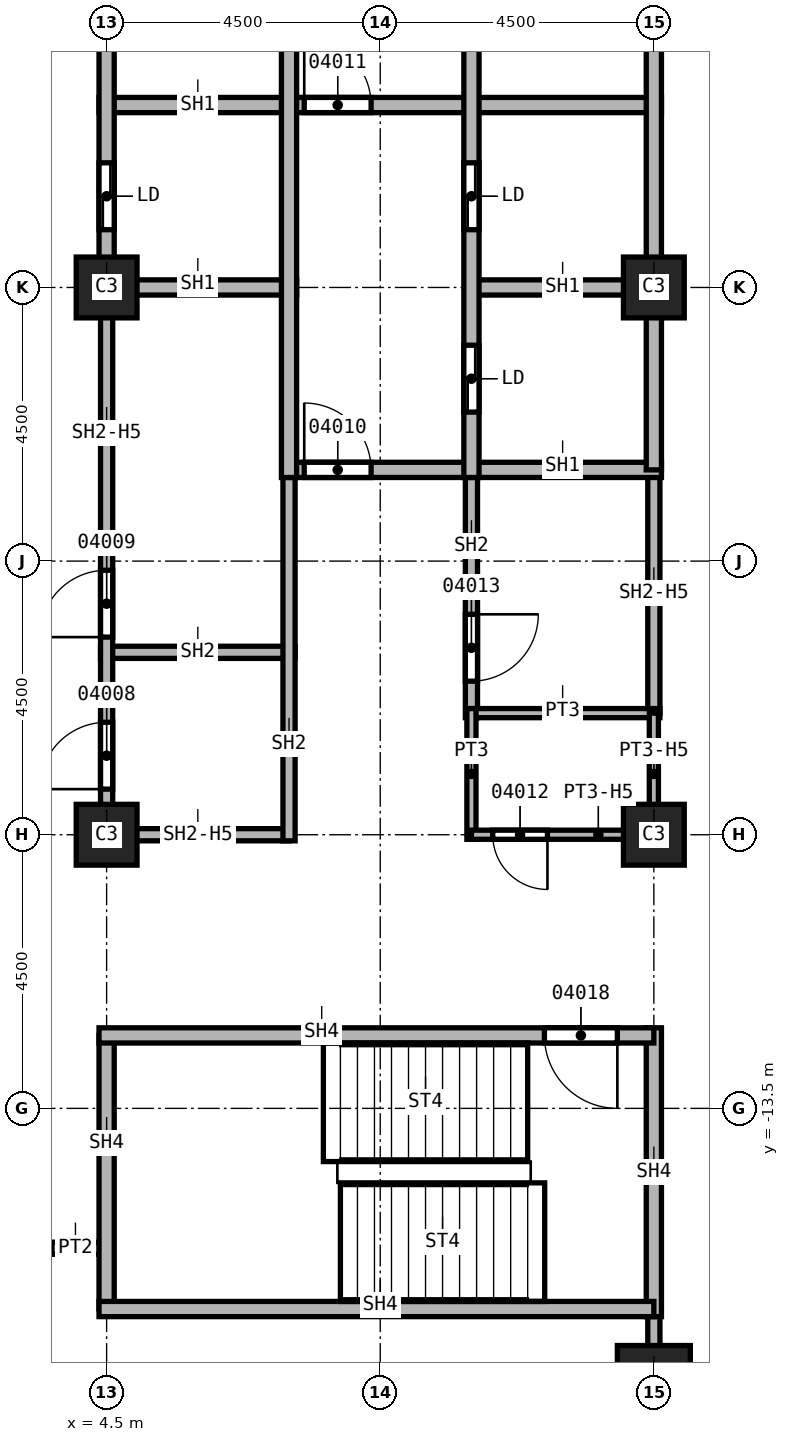
"""IFC4 building model, lengths in metres.
Left out: names, types, materials, properties, quantities, classifications, styles, units other than length and angle.
Written with IfcOpenShell. Run it as: python <this file> out.ifc"""

import sys

from ifc_helpers import new_model, si_unit, direction, frame, frame_2d, origin, origin_2d, place, context, subcontext, project, spatial, rectangle, extrude, element, fill, save


model = new_model("IFC4")
c1 = context("Model", 3, precision=1e-05, world=origin(), true_north=direction((0.0, 1.0)))
c2 = subcontext(c1, "Body", "Model", "MODEL_VIEW")
j1 = project(units=[si_unit("LENGTHUNIT", "METRE"), si_unit("PLANEANGLEUNIT", "RADIAN")], contexts=[c1])
p1 = place(None, origin())
s1 = spatial("IfcSite", under=j1, at=p1, CompositionType="ELEMENT")
p2 = place(p1, origin())
s2 = spatial("IfcBuilding", under=s1, at=p2, CompositionType="ELEMENT")
p3 = place(p2, frame((0.0, 0.0, 104.0)))
s3 = spatial("IfcBuildingStorey", under=s2, at=p3, CompositionType="ELEMENT", Elevation=104.0)
p4 = place(p3, frame((13.5, -18.0, 0.0), z_axis=(0.0, 0.0, 1.0), x_axis=(1.0, 0.0, 0.0)))
e1 = element("IfcColumn", 1, at=p4, inside=s3, PredefinedType="COLUMN", context=c2, shape_type="SweptSolid", body=[
    extrude(rectangle(XDim=1.2, YDim=1.2, at=origin_2d()), origin(), (0.0, 0.0, 1.0), 3.7),
])
for number, where, z_axis, x_axis in (
    (2, (4.5, 0.0, 0.0), (0.0, 0.0, 1.0), (1.0, 0.0, 0.0)),
    (3, (4.5, -9.0, 0.0), (0.0, 0.0, 1.0), (1.0, 0.0, 0.0)),
    (4, (13.5, 0.0, 0.0), (0.0, 0.0, 1.0), (1.0, 0.0, 0.0)),
    (5, (13.5, -9.0, 0.0), (0.0, 0.0, 1.0), (1.0, 0.0, 0.0)),
):
    element("IfcColumn", number, at=place(p3, frame(where, z_axis=z_axis, x_axis=x_axis)), inside=s3, PredefinedType="COLUMN", context=c2, shape_type="SweptSolid", body=[
        extrude(rectangle(XDim=1.0, YDim=1.0, at=origin_2d()), origin(), (0.0, 0.0, 1.0), 3.7),
    ])
p5 = place(p3, frame((4.5, -15.8, 0.0), z_axis=(0.0, 0.0, 1.0), x_axis=(-1.0, 0.0, 0.0)))
e6 = element("IfcWall", 6, at=p5, inside=s3, PredefinedType="PARTITIONING", context=c2, shape_type="SweptSolid", body=[
    extrude(rectangle(XDim=0.9, YDim=0.2, at=frame_2d((0.45, 0.0))), origin(), (0.0, 0.0, 1.0), 3.7),
])
p6 = place(p3, frame((13.5, -24.2, 0.0), z_axis=(0.0, 0.0, 1.0), x_axis=(0.0, 1.0, 0.0)))
e7 = element("IfcWall", 7, at=p6, inside=s3, PredefinedType="PARTITIONING", context=c2, shape_type="SweptSolid", body=[
    extrude(rectangle(XDim=7.525, YDim=0.2, at=frame_2d((3.762, 0.0))), origin(), (0.0, 0.0, 1.0), 3.7),
])
p7 = place(p6, frame((0.55, 0.0, 0.0)))
e8 = element("IfcOpeningElement", 8, at=p7, cuts=e7, PredefinedType="OPENING", context=c2, shape_type="SweptSolid", body=[
    extrude(rectangle(XDim=1.0, YDim=2.1, at=frame_2d((0.5, 1.05))), frame((0.0, 0.1, 0.0), z_axis=(0.0, -1.0, 0.0), x_axis=(1.0, 0.0, 0.0)), (0.0, 0.0, 1.0), 0.2),
])
p8 = place(p3, frame((4.4, -6.0, 0.0), z_axis=(0.0, 0.0, 1.0), x_axis=(1.0, 0.0, 0.0)))
e9 = element("IfcWall", 9, at=p8, inside=s3, PredefinedType="SOLIDWALL", context=c2, shape_type="SweptSolid", body=[
    extrude(rectangle(XDim=3.2, YDim=0.2, at=frame_2d((1.6, 0.0))), origin(), (0.0, 0.0, 1.0), 3.7),
])
p9 = place(p3, frame((4.5, -9.1, 0.0), z_axis=(0.0, 0.0, 1.0), x_axis=(0.0, 1.0, 0.0)))
e10 = element("IfcWall", 10, at=p9, inside=s3, PredefinedType="SOLIDWALL", context=c2, shape_type="SweptSolid", body=[
    extrude(rectangle(XDim=9.1, YDim=0.2, at=frame_2d((4.55, 0.0))), origin(), (0.0, 0.0, 1.0), 2.938),
])
p10 = place(p9, frame((0.85, 0.0, 0.0)))
e11 = element("IfcOpeningElement", 11, at=p10, cuts=e10, PredefinedType="OPENING", context=c2, shape_type="SweptSolid", body=[
    extrude(rectangle(XDim=1.1, YDim=2.1, at=frame_2d((0.55, 1.05))), frame((0.0, 0.1, 0.0), z_axis=(0.0, -1.0, 0.0), x_axis=(1.0, 0.0, 0.0)), (0.0, 0.0, 1.0), 0.2),
])
p11 = place(p9, frame((3.35, 0.0, 0.0)))
e12 = element("IfcOpeningElement", 12, at=p11, cuts=e10, PredefinedType="OPENING", context=c2, shape_type="SweptSolid", body=[
    extrude(rectangle(XDim=1.1, YDim=2.1, at=frame_2d((0.55, 1.05))), frame((0.0, 0.1, 0.0), z_axis=(0.0, -1.0, 0.0), x_axis=(1.0, 0.0, 0.0)), (0.0, 0.0, 1.0), 0.2),
])
p12 = place(p3, frame((7.5, -9.0, 0.0), z_axis=(0.0, 0.0, 1.0), x_axis=(-1.0, 0.0, 0.0)))
e13 = element("IfcWall", 13, at=p12, inside=s3, PredefinedType="SOLIDWALL", context=c2, shape_type="SweptSolid", body=[
    extrude(rectangle(XDim=3.0, YDim=0.2, at=frame_2d((1.5, 0.0))), origin(), (0.0, 0.0, 1.0), 2.938),
])
p13 = place(p3, frame((7.5, -2.875, 0.0), z_axis=(0.0, 0.0, 1.0), x_axis=(0.0, -1.0, 0.0)))
e14 = element("IfcWall", 14, at=p13, inside=s3, PredefinedType="SOLIDWALL", context=c2, shape_type="SweptSolid", body=[
    extrude(rectangle(XDim=6.225, YDim=0.2, at=frame_2d((3.113, 0.0))), origin(), (0.0, 0.0, 1.0), 3.7),
])
p14 = place(p3, frame((10.5, -2.875, 0.0), z_axis=(0.0, 0.0, 1.0), x_axis=(0.0, -1.0, 0.0)))
e15 = element("IfcWall", 15, at=p14, inside=s3, PredefinedType="SOLIDWALL", context=c2, shape_type="SweptSolid", body=[
    extrude(rectangle(XDim=4.2, YDim=0.2, at=frame_2d((2.1, 0.0))), origin(), (0.0, 0.0, 1.0), 3.7),
])
p15 = place(p14, frame((2.5, 0.0, 0.0)))
e16 = element("IfcOpeningElement", 16, at=p15, cuts=e15, PredefinedType="OPENING", context=c2, shape_type="SweptSolid", body=[
    extrude(rectangle(XDim=1.1, YDim=2.1, at=frame_2d((0.55, 1.05))), frame((0.0, 0.1, 0.0), z_axis=(0.0, -1.0, 0.0), x_axis=(1.0, 0.0, 0.0)), (0.0, 0.0, 1.0), 0.2),
])
p16 = place(p3, frame((13.5, -3.0, 0.0), z_axis=(0.0, 0.0, 1.0), x_axis=(0.0, -1.0, 0.0)))
e17 = element("IfcWall", 17, at=p16, inside=s3, PredefinedType="SOLIDWALL", context=c2, shape_type="SweptSolid", body=[
    extrude(rectangle(XDim=4.0, YDim=0.2, at=frame_2d((2.0, 0.0))), origin(), (0.0, 0.0, 1.0), 2.938),
])
p17 = place(p3, frame((4.375, 0.0, 0.0), z_axis=(0.0, 0.0, 1.0), x_axis=(1.0, 0.0, 0.0)))
e18 = element("IfcWall", 18, at=p17, inside=s3, PredefinedType="SOLIDWALL", context=c2, shape_type="SweptSolid", body=[
    extrude(rectangle(XDim=3.25, YDim=0.25, at=frame_2d((1.625, 0.0))), origin(), (0.0, 0.0, 1.0), 3.7),
])
p18 = place(p3, frame((4.375, 3.0, 0.0), z_axis=(0.0, 0.0, 1.0), x_axis=(1.0, 0.0, 0.0)))
e19 = element("IfcWall", 19, at=p18, inside=s3, PredefinedType="SOLIDWALL", context=c2, shape_type="SweptSolid", body=[
    extrude(rectangle(XDim=9.25, YDim=0.25, at=frame_2d((4.625, 0.0))), origin(), (0.0, 0.0, 1.0), 3.7),
])
p19 = place(p18, frame((3.375, 0.0, 0.0)))
e20 = element("IfcOpeningElement", 20, at=p19, cuts=e19, PredefinedType="OPENING", context=c2, shape_type="SweptSolid", body=[
    extrude(rectangle(XDim=1.1, YDim=2.1, at=frame_2d((0.55, 1.05))), frame((0.0, 0.125, 0.0), z_axis=(0.0, -1.0, 0.0), x_axis=(1.0, 0.0, 0.0)), (0.0, 0.0, 1.0), 0.25),
])
p20 = place(p3, frame((4.5, 0.0, 0.0), z_axis=(0.0, 0.0, 1.0), x_axis=(0.0, 1.0, 0.0)))
e21 = element("IfcWall", 21, at=p20, inside=s3, PredefinedType="SOLIDWALL", context=c2, shape_type="SweptSolid", body=[
    extrude(rectangle(XDim=9.125, YDim=0.25, at=frame_2d((4.562, 0.0))), origin(), (0.0, 0.0, 1.0), 2.938),
])
p21 = place(p20, frame((0.95, 0.0, 0.0)))
e22 = element("IfcOpeningElement", 22, at=p21, cuts=e21, PredefinedType="OPENING", context=c2, shape_type="SweptSolid", body=[
    extrude(rectangle(XDim=1.1, YDim=2.1, at=frame_2d((0.55, 1.05))), frame((0.0, 0.125, 0.0), z_axis=(0.0, -1.0, 0.0), x_axis=(1.0, 0.0, 0.0)), (0.0, 0.0, 1.0), 0.25),
])
p22 = place(p20, frame((3.95, 0.0, 0.0)))
e23 = element("IfcOpeningElement", 23, at=p22, cuts=e21, PredefinedType="OPENING", context=c2, shape_type="SweptSolid", body=[
    extrude(rectangle(XDim=1.1, YDim=2.1, at=frame_2d((0.55, 1.05))), frame((0.0, 0.125, 0.0), z_axis=(0.0, -1.0, 0.0), x_axis=(1.0, 0.0, 0.0)), (0.0, 0.0, 1.0), 0.25),
])
p23 = place(p20, frame((7.012, 0.0, 0.0)))
e24 = element("IfcOpeningElement", 24, at=p23, cuts=e21, PredefinedType="OPENING", context=c2, shape_type="SweptSolid", body=[
    extrude(rectangle(XDim=1.1, YDim=2.1, at=frame_2d((0.55, 1.05))), frame((0.0, 0.125, 0.0), z_axis=(0.0, -1.0, 0.0), x_axis=(1.0, 0.0, 0.0)), (0.0, 0.0, 1.0), 0.25),
])
p24 = place(p3, frame((7.5, -3.0, 0.0), z_axis=(0.0, 0.0, 1.0), x_axis=(1.0, 0.0, 0.0)))
e25 = element("IfcWall", 25, at=p24, inside=s3, PredefinedType="SOLIDWALL", context=c2, shape_type="SweptSolid", body=[
    extrude(rectangle(XDim=6.125, YDim=0.25, at=frame_2d((3.062, 0.0))), origin(), (0.0, 0.0, 1.0), 3.7),
])
p25 = place(p24, frame((0.25, 0.0, 0.0)))
e26 = element("IfcOpeningElement", 26, at=p25, cuts=e25, PredefinedType="OPENING", context=c2, shape_type="SweptSolid", body=[
    extrude(rectangle(XDim=1.1, YDim=2.1, at=frame_2d((0.55, 1.05))), frame((0.0, 0.125, 0.0), z_axis=(0.0, -1.0, 0.0), x_axis=(1.0, 0.0, 0.0)), (0.0, 0.0, 1.0), 0.25),
])
p26 = place(p3, frame((7.5, 9.125, 0.0), z_axis=(0.0, 0.0, 1.0), x_axis=(0.0, -1.0, 0.0)))
e27 = element("IfcWall", 27, at=p26, inside=s3, PredefinedType="SOLIDWALL", context=c2, shape_type="SweptSolid", body=[
    extrude(rectangle(XDim=12.25, YDim=0.25, at=frame_2d((6.125, 0.0))), origin(), (0.0, 0.0, 1.0), 3.7),
])
p27 = place(p3, frame((10.5, 0.0, 0.0), z_axis=(0.0, 0.0, 1.0), x_axis=(1.0, 0.0, 0.0)))
e28 = element("IfcWall", 28, at=p27, inside=s3, PredefinedType="SOLIDWALL", context=c2, shape_type="SweptSolid", body=[
    extrude(rectangle(XDim=3.125, YDim=0.25, at=frame_2d((1.562, 0.0))), origin(), (0.0, 0.0, 1.0), 3.7),
])
p28 = place(p3, frame((10.5, 6.125, 0.0), z_axis=(0.0, 0.0, 1.0), x_axis=(0.0, -1.0, 0.0)))
e29 = element("IfcWall", 29, at=p28, inside=s3, PredefinedType="SOLIDWALL", context=c2, shape_type="SweptSolid", body=[
    extrude(rectangle(XDim=9.25, YDim=0.25, at=frame_2d((4.625, 0.0))), origin(), (0.0, 0.0, 1.0), 3.7),
])
p29 = place(p28, frame((7.075, 0.0, 0.0)))
e30 = element("IfcOpeningElement", 30, at=p29, cuts=e29, PredefinedType="OPENING", context=c2, shape_type="SweptSolid", body=[
    extrude(rectangle(XDim=1.1, YDim=2.1, at=frame_2d((0.55, 1.05))), frame((0.0, 0.125, 0.0), z_axis=(0.0, -1.0, 0.0), x_axis=(1.0, 0.0, 0.0)), (0.0, 0.0, 1.0), 0.25),
])
p30 = place(p28, frame((4.075, 0.0, 0.0)))
e31 = element("IfcOpeningElement", 31, at=p30, cuts=e29, PredefinedType="OPENING", context=c2, shape_type="SweptSolid", body=[
    extrude(rectangle(XDim=1.1, YDim=2.1, at=frame_2d((0.55, 1.05))), frame((0.0, 0.125, 0.0), z_axis=(0.0, -1.0, 0.0), x_axis=(1.0, 0.0, 0.0)), (0.0, 0.0, 1.0), 0.25),
])
p31 = place(p3, frame((13.5, 6.0, 0.0), z_axis=(0.0, 0.0, 1.0), x_axis=(0.0, -1.0, 0.0)))
e32 = element("IfcWall", 32, at=p31, inside=s3, PredefinedType="SOLIDWALL", context=c2, shape_type="SweptSolid", body=[
    extrude(rectangle(XDim=9.0, YDim=0.25, at=frame_2d((4.5, 0.0))), origin(), (0.0, 0.0, 1.0), 2.938),
])
p32 = place(p3, frame((4.5, -16.8, 0.0), z_axis=(0.0, 0.0, 1.0), x_axis=(0.0, 1.0, 0.0)))
e33 = element("IfcWall", 33, at=p32, inside=s3, PredefinedType="SOLIDWALL", context=c2, shape_type="SweptSolid", body=[
    extrude(rectangle(XDim=4.5, YDim=0.25, at=frame_2d((2.25, 0.0))), origin(), (0.0, 0.0, 1.0), 3.7),
])
p33 = place(p3, frame((13.5, -16.925, 0.0), z_axis=(0.0, 0.0, 1.0), x_axis=(0.0, 1.0, 0.0)))
e34 = element("IfcWall", 34, at=p33, inside=s3, PredefinedType="SOLIDWALL", context=c2, shape_type="SweptSolid", body=[
    extrude(rectangle(XDim=4.75, YDim=0.25, at=frame_2d((2.375, 0.0))), origin(), (0.0, 0.0, 1.0), 3.7),
])
p34 = place(p3, frame((13.5, -16.8, 0.0), z_axis=(0.0, 0.0, 1.0), x_axis=(-1.0, 0.0, 0.0)))
e35 = element("IfcWall", 35, at=p34, inside=s3, PredefinedType="SOLIDWALL", context=c2, shape_type="SweptSolid", body=[
    extrude(rectangle(XDim=9.125, YDim=0.25, at=frame_2d((4.562, 0.0))), origin(), (0.0, 0.0, 1.0), 3.7),
])
p35 = place(p3, frame((13.5, -12.3, 0.0), z_axis=(0.0, 0.0, 1.0), x_axis=(-1.0, 0.0, 0.0)))
e36 = element("IfcWall", 36, at=p35, inside=s3, PredefinedType="SOLIDWALL", context=c2, shape_type="SweptSolid", body=[
    extrude(rectangle(XDim=9.125, YDim=0.25, at=frame_2d((4.562, 0.0))), origin(), (0.0, 0.0, 1.0), 3.7),
])
p36 = place(p35, frame((0.6, 0.0, 0.0)))
e37 = element("IfcOpeningElement", 37, at=p36, cuts=e36, PredefinedType="OPENING", context=c2, shape_type="SweptSolid", body=[
    extrude(rectangle(XDim=1.2, YDim=2.1, at=frame_2d((0.6, 1.05))), frame((0.0, 0.125, 0.0), z_axis=(0.0, -1.0, 0.0), x_axis=(1.0, 0.0, 0.0)), (0.0, 0.0, 1.0), 0.25),
])
p37 = place(p3, frame((10.5, -7.0, 0.0), z_axis=(0.0, 0.0, 1.0), x_axis=(1.0, 0.0, 0.0)))
e38 = element("IfcWall", 38, at=p37, inside=s3, PredefinedType="PARTITIONING", context=c2, shape_type="SweptSolid", body=[
    extrude(rectangle(XDim=3.1, YDim=0.15, at=frame_2d((1.55, 0.0))), origin(), (0.0, 0.0, 1.0), 3.7),
])
p38 = place(p3, frame((10.5, -6.925, 0.0), z_axis=(0.0, 0.0, 1.0), x_axis=(0.0, -1.0, 0.0)))
e39 = element("IfcWall", 39, at=p38, inside=s3, PredefinedType="PARTITIONING", context=c2, shape_type="SweptSolid", body=[
    extrude(rectangle(XDim=2.15, YDim=0.15, at=frame_2d((1.075, 0.0))), origin(), (0.0, 0.0, 1.0), 3.7),
])
p39 = place(p3, frame((13.5, -9.0, 0.0), z_axis=(0.0, 0.0, 1.0), x_axis=(-1.0, 0.0, 0.0)))
e40 = element("IfcWall", 40, at=p39, inside=s3, PredefinedType="PARTITIONING", context=c2, shape_type="SweptSolid", body=[
    extrude(rectangle(XDim=3.0, YDim=0.15, at=frame_2d((1.5, 0.0))), origin(), (0.0, 0.0, 1.0), 2.938),
])
p40 = place(p39, frame((1.75, 0.0, 0.0)))
e41 = element("IfcOpeningElement", 41, at=p40, cuts=e40, PredefinedType="OPENING", context=c2, shape_type="SweptSolid", body=[
    extrude(rectangle(XDim=0.9, YDim=2.1, at=frame_2d((0.45, 1.05))), frame((0.0, 0.075, 0.0), z_axis=(0.0, -1.0, 0.0), x_axis=(1.0, 0.0, 0.0)), (0.0, 0.0, 1.0), 0.15),
])
p41 = place(p3, frame((13.5, -7.0, 0.0), z_axis=(0.0, 0.0, 1.0), x_axis=(0.0, -1.0, 0.0)))
e42 = element("IfcWall", 42, at=p41, inside=s3, PredefinedType="PARTITIONING", context=c2, shape_type="SweptSolid", body=[
    extrude(rectangle(XDim=2.075, YDim=0.15, at=frame_2d((1.038, 0.0))), origin(), (0.0, 0.0, 1.0), 2.938),
])
p42 = place(p10, origin())
e43 = element("IfcDoor", 43, at=p42, inside=s3, OperationType="SINGLE_SWING_LEFT", PredefinedType="DOOR", context=c2, shape_type="SweptSolid", body=[
    extrude(rectangle(XDim=1.1, YDim=2.1, at=frame_2d((0.55, 1.05))), frame((0.0, 0.025, 0.0), z_axis=(0.0, -1.0, 0.0), x_axis=(1.0, 0.0, 0.0)), (0.0, 0.0, 1.0), 0.05),
])
fill(e11, e43)
p43 = place(p11, origin())
e44 = element("IfcDoor", 44, at=p43, inside=s3, OperationType="SINGLE_SWING_RIGHT", PredefinedType="DOOR", context=c2, shape_type="SweptSolid", body=[
    extrude(rectangle(XDim=1.1, YDim=2.1, at=frame_2d((0.55, 1.05))), frame((0.0, 0.025, 0.0), z_axis=(0.0, -1.0, 0.0), x_axis=(1.0, 0.0, 0.0)), (0.0, 0.0, 1.0), 0.05),
])
fill(e12, e44)
p44 = place(p25, origin())
e45 = element("IfcDoor", 45, at=p44, inside=s3, OperationType="SINGLE_SWING_LEFT", PredefinedType="DOOR", context=c2, shape_type="SweptSolid", body=[
    extrude(rectangle(XDim=1.1, YDim=2.1, at=frame_2d((0.55, 1.05))), frame((0.0, 0.025, 0.0), z_axis=(0.0, -1.0, 0.0), x_axis=(1.0, 0.0, 0.0)), (0.0, 0.0, 1.0), 0.05),
])
fill(e26, e45)
p45 = place(p19, origin())
e46 = element("IfcDoor", 46, at=p45, inside=s3, OperationType="SINGLE_SWING_RIGHT", PredefinedType="DOOR", context=c2, shape_type="SweptSolid", body=[
    extrude(rectangle(XDim=1.1, YDim=2.1, at=frame_2d((0.55, 1.05))), frame((0.0, 0.025, 0.0), z_axis=(0.0, -1.0, 0.0), x_axis=(1.0, 0.0, 0.0)), (0.0, 0.0, 1.0), 0.05),
])
fill(e20, e46)
p46 = place(p40, origin())
e47 = element("IfcDoor", 47, at=p46, inside=s3, OperationType="SINGLE_SWING_LEFT", PredefinedType="DOOR", context=c2, shape_type="SweptSolid", body=[
    extrude(rectangle(XDim=0.9, YDim=2.1, at=frame_2d((0.45, 1.05))), frame((0.0, 0.025, 0.0), z_axis=(0.0, -1.0, 0.0), x_axis=(1.0, 0.0, 0.0)), (0.0, 0.0, 1.0), 0.05),
])
fill(e41, e47)
p47 = place(p15, origin())
e48 = element("IfcDoor", 48, at=p47, inside=s3, OperationType="SINGLE_SWING_RIGHT", PredefinedType="DOOR", context=c2, shape_type="SweptSolid", body=[
    extrude(rectangle(XDim=1.1, YDim=2.1, at=frame_2d((0.55, 1.05))), frame((0.0, 0.025, 0.0), z_axis=(0.0, -1.0, 0.0), x_axis=(1.0, 0.0, 0.0)), (0.0, 0.0, 1.0), 0.05),
])
fill(e16, e48)
p48 = place(p36, origin())
e49 = element("IfcDoor", 49, at=p48, inside=s3, OperationType="SINGLE_SWING_LEFT", PredefinedType="DOOR", context=c2, shape_type="SweptSolid", body=[
    extrude(rectangle(XDim=1.2, YDim=2.1, at=frame_2d((0.6, 1.05))), frame((0.0, 0.025, 0.0), z_axis=(0.0, -1.0, 0.0), x_axis=(1.0, 0.0, 0.0)), (0.0, 0.0, 1.0), 0.05),
])
fill(e37, e49)
p49 = place(p21, origin())
e50 = element("IfcDoor", 50, at=p49, inside=s3, OperationType="SLIDING_TO_LEFT", PredefinedType="DOOR", context=c2, shape_type="SweptSolid", body=[
    extrude(rectangle(XDim=1.1, YDim=2.1, at=frame_2d((0.55, 1.05))), frame((0.0, 0.025, 0.0), z_axis=(0.0, -1.0, 0.0), x_axis=(1.0, 0.0, 0.0)), (0.0, 0.0, 1.0), 0.05),
])
fill(e22, e50)
p50 = place(p29, origin())
e51 = element("IfcDoor", 51, at=p50, inside=s3, OperationType="SLIDING_TO_LEFT", PredefinedType="DOOR", context=c2, shape_type="SweptSolid", body=[
    extrude(rectangle(XDim=1.1, YDim=2.1, at=frame_2d((0.55, 1.05))), frame((0.0, 0.025, 0.0), z_axis=(0.0, -1.0, 0.0), x_axis=(1.0, 0.0, 0.0)), (0.0, 0.0, 1.0), 0.05),
])
fill(e30, e51)
p51 = place(p30, origin())
e52 = element("IfcDoor", 52, at=p51, inside=s3, OperationType="SLIDING_TO_LEFT", PredefinedType="DOOR", context=c2, shape_type="SweptSolid", body=[
    extrude(rectangle(XDim=1.1, YDim=2.1, at=frame_2d((0.55, 1.05))), frame((0.0, 0.025, 0.0), z_axis=(0.0, -1.0, 0.0), x_axis=(1.0, 0.0, 0.0)), (0.0, 0.0, 1.0), 0.05),
])
fill(e31, e52)
save(model, sys.argv[1])
